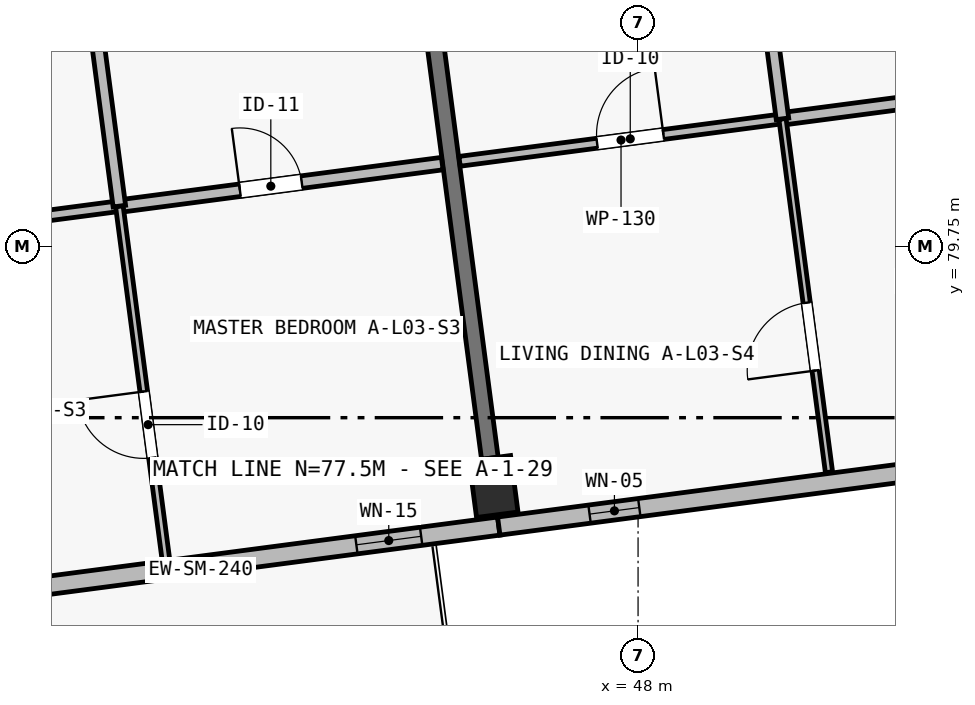
"""IFC4 building model, lengths in metres.
Left out: names, types, materials, properties, quantities, classifications, styles, units other than length and angle.
Written with IfcOpenShell. Run it as: python <this file> out.ifc"""

import sys

from ifc_helpers import new_model, si_unit, direction, frame, frame_2d, origin, origin_2d, place, context, subcontext, project, spatial, rectangle, extrude, element, fill, save


model = new_model("IFC4")
c1 = context("Model", 3, precision=1e-05, world=origin(), true_north=direction((0.0, 1.0)))
c2 = subcontext(c1, "Body", "Model", "MODEL_VIEW")
j1 = project(units=[si_unit("LENGTHUNIT", "METRE"), si_unit("PLANEANGLEUNIT", "RADIAN")], contexts=[c1])
p1 = place(None, origin())
s1 = spatial("IfcSite", under=j1, at=p1, CompositionType="ELEMENT")
p2 = place(p1, origin())
s2 = spatial("IfcBuilding", under=s1, at=p2, CompositionType="ELEMENT")
p3 = place(p2, frame((0.0, 0.0, 11.65)))
s3 = spatial("IfcBuildingStorey", under=s2, at=p3, CompositionType="ELEMENT", Elevation=11.65)
p4 = place(p3, frame((46.099, 76.594, 0.0), z_axis=(0.0, 0.0, 1.0), x_axis=(0.991444861374, 0.13052619222, 0.0)))
e1 = element("IfcColumn", 1, at=p4, inside=s3, PredefinedType="COLUMN", context=c2, shape_type="SweptSolid", body=[
    extrude(rectangle(XDim=0.55, YDim=0.75, at=origin_2d()), origin(), (0.0, 0.0, 1.0), 3.25),
])
p5 = place(p3, frame((46.05, 76.966, 0.0), z_axis=(0.0, 0.0, 1.0), x_axis=(-0.130519009654, 0.99144580695, 0.0)))
e2 = element("IfcWall", 2, at=p5, inside=s3, PredefinedType="SHEAR", context=c2, shape_type="SweptSolid", body=[
    extrude(rectangle(XDim=7.05, YDim=0.22, at=frame_2d((3.525, 0.0))), origin(), (0.0, 0.0, 1.0), 2.5),
])
p6 = place(p3, frame((46.167, 76.074, 0.0), z_axis=(0.0, 0.0, 1.0), x_axis=(-0.991444377792, -0.130529865336, 0.0)))
e3 = element("IfcWall", 3, at=p6, inside=s3, PredefinedType="SOLIDWALL", context=c2, shape_type="SweptSolid", body=[
    extrude(rectangle(XDim=8.8, YDim=0.24, at=frame_2d((4.4, 0.0))), origin(), (0.0, 0.0, 1.0), 3.0),
])
p7 = place(p6, frame((5.997, 0.0, 0.0)))
e4 = element("IfcOpeningElement", 4, at=p7, cuts=e3, PredefinedType="OPENING", context=c2, shape_type="SweptSolid", body=[
    extrude(rectangle(XDim=1.8, YDim=2.12, at=frame_2d((0.9, 1.06))), frame((0.0, 0.135, 0.0), z_axis=(0.0, -1.0, 0.0), x_axis=(1.0, 0.0, 0.0)), (0.0, 0.0, 1.0), 0.27),
])
p8 = place(p6, frame((1.03, 0.0, 0.42)))
e5 = element("IfcOpeningElement", 5, at=p8, cuts=e3, PredefinedType="OPENING", context=c2, shape_type="SweptSolid", body=[
    extrude(rectangle(XDim=0.86, YDim=2.36, at=frame_2d((0.43, 1.18))), frame((0.0, 0.135, 0.0), z_axis=(0.0, -1.0, 0.0), x_axis=(1.0, 0.0, 0.0)), (0.0, 0.0, 1.0), 0.27),
])
p9 = place(p3, frame((54.892, 77.223, 0.0), z_axis=(0.0, 0.0, 1.0), x_axis=(-0.991443905089, -0.130533455715, 0.0)))
e6 = element("IfcWall", 6, at=p9, inside=s3, PredefinedType="SOLIDWALL", context=c2, shape_type="SweptSolid", body=[
    extrude(rectangle(XDim=8.8, YDim=0.24, at=frame_2d((4.4, 0.0))), origin(), (0.0, 0.0, 1.0), 3.0),
])
p10 = place(p9, frame((0.61, 0.0, 0.48)))
e7 = element("IfcOpeningElement", 7, at=p10, cuts=e6, PredefinedType="OPENING", context=c2, shape_type="SweptSolid", body=[
    extrude(rectangle(XDim=0.6, YDim=2.22, at=frame_2d((0.3, 1.11))), frame((0.0, 0.135, 0.0), z_axis=(0.0, -1.0, 0.0), x_axis=(1.0, 0.0, 0.0)), (0.0, 0.0, 1.0), 0.27),
])
p11 = place(p9, frame((2.576, 0.0, 0.52)))
e8 = element("IfcOpeningElement", 8, at=p11, cuts=e6, PredefinedType="OPENING", context=c2, shape_type="SweptSolid", body=[
    extrude(rectangle(XDim=0.62, YDim=2.28, at=frame_2d((0.31, 1.14))), frame((0.0, 0.135, 0.0), z_axis=(0.0, -1.0, 0.0), x_axis=(1.0, 0.0, 0.0)), (0.0, 0.0, 1.0), 0.27),
])
p12 = place(p9, frame((6.935, 0.0, 0.48)))
e9 = element("IfcOpeningElement", 9, at=p12, cuts=e6, PredefinedType="OPENING", context=c2, shape_type="SweptSolid", body=[
    extrude(rectangle(XDim=0.66, YDim=2.32, at=frame_2d((0.33, 1.16))), frame((0.0, 0.135, 0.0), z_axis=(0.0, -1.0, 0.0), x_axis=(1.0, 0.0, 0.0)), (0.0, 0.0, 1.0), 0.27),
])
p13 = place(p3, frame((36.927, 79.724, 0.0), z_axis=(0.0, 0.0, 1.0), x_axis=(0.991444014242, 0.130532626667, 0.0)))
e10 = element("IfcWall", 10, at=p13, inside=s3, PredefinedType="PARTITIONING", context=c2, shape_type="SweptSolid", body=[
    extrude(rectangle(XDim=4.285, YDim=0.14, at=frame_2d((2.143, 0.0))), origin(), (0.0, 0.0, 1.0), 2.97),
])
p14 = place(p13, frame((1.825, 0.0, 0.0)))
e11 = element("IfcOpeningElement", 11, at=p14, cuts=e10, PredefinedType="OPENING", context=c2, shape_type="SweptSolid", body=[
    extrude(rectangle(XDim=0.9, YDim=2.1, at=frame_2d((0.45, 1.05))), frame((0.0, 0.085, 0.0), z_axis=(0.0, -1.0, 0.0), x_axis=(1.0, 0.0, 0.0)), (0.0, 0.0, 1.0), 0.17),
])
p15 = place(p3, frame((41.175, 80.283, 0.0), z_axis=(0.0, 0.0, 1.0), x_axis=(0.991444014242, 0.130532626667, 0.0)))
e12 = element("IfcWall", 12, at=p15, inside=s3, PredefinedType="PLUMBINGWALL", context=c2, shape_type="SweptSolid", body=[
    extrude(rectangle(XDim=4.285, YDim=0.165, at=frame_2d((2.143, 0.0))), origin(), (0.0, 0.0, 1.0), 2.97),
])
p16 = place(p15, frame((1.6, 0.0, 0.0)))
e13 = element("IfcOpeningElement", 13, at=p16, cuts=e12, PredefinedType="OPENING", context=c2, shape_type="SweptSolid", body=[
    extrude(rectangle(XDim=0.82, YDim=2.08, at=frame_2d((0.41, 1.04))), frame((0.0, 0.097, 0.0), z_axis=(0.0, -1.0, 0.0), x_axis=(1.0, 0.0, 0.0)), (0.0, 0.0, 1.0), 0.195),
])
p17 = place(p3, frame((41.787, 75.634, 0.0), z_axis=(0.0, 0.0, 1.0), x_axis=(-0.130502988823, 0.991447915883, 0.0)))
e14 = element("IfcWall", 14, at=p17, inside=s3, PredefinedType="PARTITIONING", context=c2, shape_type="SweptSolid", body=[
    extrude(rectangle(XDim=4.69, YDim=0.1, at=frame_2d((2.345, 0.0))), origin(), (0.0, 0.0, 1.0), 2.97),
])
p18 = place(p17, frame((1.35, 0.0, 0.0)))
e15 = element("IfcOpeningElement", 15, at=p18, cuts=e14, PredefinedType="OPENING", context=c2, shape_type="SweptSolid", body=[
    extrude(rectangle(XDim=0.88, YDim=2.1, at=frame_2d((0.44, 1.05))), frame((0.0, 0.065, 0.0), z_axis=(0.0, -1.0, 0.0), x_axis=(1.0, 0.0, 0.0)), (0.0, 0.0, 1.0), 0.13),
])
p19 = place(p3, frame((41.175, 80.283, 0.0), z_axis=(0.0, 0.0, 1.0), x_axis=(-0.130539898676, 0.991443056788, 0.0)))
e16 = element("IfcWall", 16, at=p19, inside=s3, PredefinedType="PLUMBINGWALL", context=c2, shape_type="SweptSolid", body=[
    extrude(rectangle(XDim=3.92, YDim=0.165, at=frame_2d((1.96, 0.0))), origin(), (0.0, 0.0, 1.0), 2.97),
])
p20 = place(p3, frame((45.652, 80.873, 0.0), z_axis=(0.0, 0.0, 1.0), x_axis=(0.991444014242, 0.130532626667, 0.0)))
e17 = element("IfcWall", 17, at=p20, inside=s3, PredefinedType="PARTITIONING", context=c2, shape_type="SweptSolid", body=[
    extrude(rectangle(XDim=4.285, YDim=0.13, at=frame_2d((2.143, 0.0))), origin(), (0.0, 0.0, 1.0), 2.97),
])
p21 = place(p20, frame((1.825, 0.0, 0.0)))
e18 = element("IfcOpeningElement", 18, at=p21, cuts=e17, PredefinedType="OPENING", context=c2, shape_type="SweptSolid", body=[
    extrude(rectangle(XDim=0.88, YDim=2.1, at=frame_2d((0.44, 1.05))), frame((0.0, 0.08, 0.0), z_axis=(0.0, -1.0, 0.0), x_axis=(1.0, 0.0, 0.0)), (0.0, 0.0, 1.0), 0.16),
])
p22 = place(p3, frame((49.9, 81.432, 0.0), z_axis=(0.0, 0.0, 1.0), x_axis=(0.991444014242, 0.130532626667, 0.0)))
e19 = element("IfcWall", 19, at=p22, inside=s3, PredefinedType="PLUMBINGWALL", context=c2, shape_type="SweptSolid", body=[
    extrude(rectangle(XDim=4.285, YDim=0.165, at=frame_2d((2.143, 0.0))), origin(), (0.0, 0.0, 1.0), 2.97),
])
p23 = place(p22, frame((1.6, 0.0, 0.0)))
e20 = element("IfcOpeningElement", 20, at=p23, cuts=e19, PredefinedType="OPENING", context=c2, shape_type="SweptSolid", body=[
    extrude(rectangle(XDim=0.82, YDim=2.08, at=frame_2d((0.41, 1.04))), frame((0.0, 0.097, 0.0), z_axis=(0.0, -1.0, 0.0), x_axis=(1.0, 0.0, 0.0)), (0.0, 0.0, 1.0), 0.195),
])
p24 = place(p3, frame((50.512, 76.782, 0.0), z_axis=(0.0, 0.0, 1.0), x_axis=(-0.130554157184, 0.991441179315, 0.0)))
e21 = element("IfcWall", 21, at=p24, inside=s3, PredefinedType="PARTITIONING", context=c2, shape_type="SweptSolid", body=[
    extrude(rectangle(XDim=4.69, YDim=0.095, at=frame_2d((2.345, 0.0))), origin(), (0.0, 0.0, 1.0), 2.97),
])
p25 = place(p24, frame((1.35, 0.0, 0.0)))
e22 = element("IfcOpeningElement", 22, at=p25, cuts=e21, PredefinedType="OPENING", context=c2, shape_type="SweptSolid", body=[
    extrude(rectangle(XDim=0.9, YDim=2.1, at=frame_2d((0.45, 1.05))), frame((0.0, 0.062, 0.0), z_axis=(0.0, -1.0, 0.0), x_axis=(1.0, 0.0, 0.0)), (0.0, 0.0, 1.0), 0.125),
])
p26 = place(p3, frame((49.9, 81.432, 0.0), z_axis=(0.0, 0.0, 1.0), x_axis=(-0.130539898676, 0.991443056788, 0.0)))
e23 = element("IfcWall", 23, at=p26, inside=s3, PredefinedType="PLUMBINGWALL", context=c2, shape_type="SweptSolid", body=[
    extrude(rectangle(XDim=3.92, YDim=0.165, at=frame_2d((1.96, 0.0))), origin(), (0.0, 0.0, 1.0), 2.97),
])
p27 = place(p8, origin())
e24 = element("IfcWindow", 24, at=p27, inside=s3, PartitioningType="SINGLE_PANEL", PredefinedType="WINDOW", context=c2, shape_type="SweptSolid", body=[
    extrude(rectangle(XDim=0.86, YDim=2.36, at=frame_2d((0.43, 1.18))), frame((0.0, 0.03, 0.0), z_axis=(0.0, -1.0, 0.0), x_axis=(1.0, 0.0, 0.0)), (0.0, 0.0, 1.0), 0.06),
])
fill(e5, e24)
p28 = place(p12, origin())
e25 = element("IfcWindow", 25, at=p28, inside=s3, PartitioningType="SINGLE_PANEL", PredefinedType="WINDOW", context=c2, shape_type="SweptSolid", body=[
    extrude(rectangle(XDim=0.66, YDim=2.32, at=frame_2d((0.33, 1.16))), frame((0.0, 0.03, 0.0), z_axis=(0.0, -1.0, 0.0), x_axis=(1.0, 0.0, 0.0)), (0.0, 0.0, 1.0), 0.06),
])
fill(e9, e25)
p29 = place(p16, origin())
e26 = element("IfcDoor", 26, at=p29, inside=s3, OperationType="SINGLE_SWING_LEFT", PredefinedType="DOOR", context=c2, shape_type="SweptSolid", body=[
    extrude(rectangle(XDim=0.82, YDim=2.08, at=frame_2d((0.41, 1.04))), frame((0.0, 0.025, 0.0), z_axis=(0.0, -1.0, 0.0), x_axis=(1.0, 0.0, 0.0)), (0.0, 0.0, 1.0), 0.05),
])
fill(e13, e26)
p30 = place(p18, origin())
e27 = element("IfcDoor", 27, at=p30, inside=s3, OperationType="SINGLE_SWING_RIGHT", PredefinedType="DOOR", context=c2, shape_type="SweptSolid", body=[
    extrude(rectangle(XDim=0.88, YDim=2.1, at=frame_2d((0.44, 1.05))), frame((0.0, 0.025, 0.0), z_axis=(0.0, -1.0, 0.0), x_axis=(1.0, 0.0, 0.0)), (0.0, 0.0, 1.0), 0.05),
])
fill(e15, e27)
p31 = place(p21, origin())
e28 = element("IfcDoor", 28, at=p31, inside=s3, OperationType="SINGLE_SWING_RIGHT", PredefinedType="DOOR", context=c2, shape_type="SweptSolid", body=[
    extrude(rectangle(XDim=0.88, YDim=2.1, at=frame_2d((0.44, 1.05))), frame((0.0, 0.025, 0.0), z_axis=(0.0, -1.0, 0.0), x_axis=(1.0, 0.0, 0.0)), (0.0, 0.0, 1.0), 0.05),
])
fill(e18, e28)
p32 = place(p25, origin())
e29 = element("IfcDoor", 29, at=p32, inside=s3, OperationType="SINGLE_SWING_LEFT", PredefinedType="DOOR", context=c2, shape_type="SweptSolid", body=[
    extrude(rectangle(XDim=0.9, YDim=2.1, at=frame_2d((0.45, 1.05))), frame((0.0, 0.025, 0.0), z_axis=(0.0, -1.0, 0.0), x_axis=(1.0, 0.0, 0.0)), (0.0, 0.0, 1.0), 0.05),
])
fill(e22, e29)
save(model, sys.argv[1])
